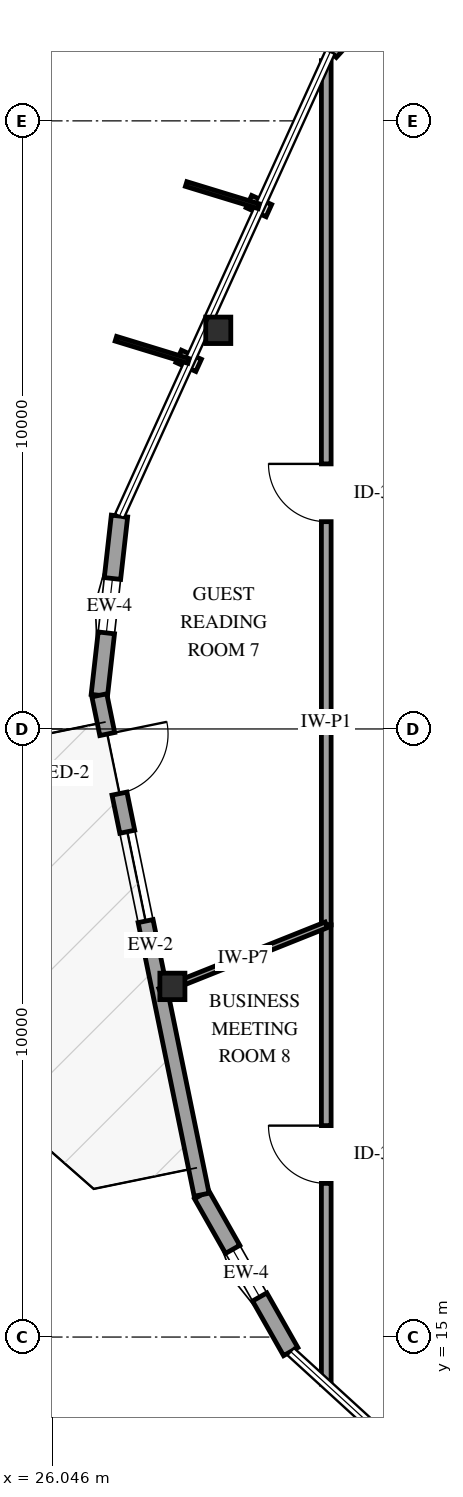
"""IFC4 building model, lengths in metres.
Left out: names, types, materials, properties, quantities, classifications, styles, units other than length and angle.
Written with IfcOpenShell. Run it as: python <this file> out.ifc"""

import sys

from ifc_helpers import new_model, si_unit, direction, frame, frame_2d, origin, origin_2d, place, context, subcontext, project, spatial, rectangle, i_section, extrude, element, fill, save


model = new_model("IFC4")
c1 = context("Model", 3, precision=1e-05, world=origin(), true_north=direction((0.0, 1.0)))
c2 = subcontext(c1, "Body", "Model", "MODEL_VIEW")
j1 = project(units=[si_unit("LENGTHUNIT", "METRE"), si_unit("PLANEANGLEUNIT", "RADIAN")], contexts=[c1])
p1 = place(None, origin())
s1 = spatial("IfcSite", under=j1, at=p1, CompositionType="ELEMENT")
p2 = place(p1, origin())
s2 = spatial("IfcBuilding", under=s1, at=p2, CompositionType="ELEMENT")
p3 = place(p2, frame((0.0, 0.0, 142.6)))
s3 = spatial("IfcBuildingStorey", under=s2, at=p3, CompositionType="ELEMENT", Elevation=142.6)
for number, where, z_axis, x_axis in (
    (1, (28.774, 31.556, 0.0), (0.0, 0.0, 1.0), (1.0, 0.0, 0.0)),
    (2, (28.02, 20.766, 0.0), (0.0, 0.0, 1.0), (1.0, 0.0, 0.0)),
):
    element("IfcColumn", number, at=place(p3, frame(where, z_axis=z_axis, x_axis=x_axis)), inside=s3, PredefinedType="COLUMN", context=c2, shape_type="SweptSolid", body=[
        extrude(i_section(OverallWidth=0.412, OverallDepth=0.435, WebThickness=0.036, FlangeThickness=0.057, FilletRadius=0.038, at=origin_2d()), origin(), (0.0, 0.0, 1.0), 3.6),
    ])
p4 = place(p3, frame((32.617, 38.325, 0.0), z_axis=(0.0, 0.0, 1.0), x_axis=(-0.67449763944, -0.738277003834, 0.0)))
e3 = element("IfcWall", 3, at=p4, inside=s3, PredefinedType="SOLIDWALL", context=c2, shape_type="SweptSolid", body=[
    extrude(rectangle(XDim=2.967, YDim=0.27, at=frame_2d((1.483, 0.0))), origin(), (0.0, 0.0, 1.0), 2.679),
])
p5 = place(p3, frame((27.15, 28.501, 0.0), z_axis=(0.0, 0.0, 1.0), x_axis=(-0.111840485986, -0.993726172391, 0.0)))
e4 = element("IfcWall", 4, at=p5, inside=s3, PredefinedType="SOLIDWALL", context=c2, shape_type="SweptSolid", body=[
    extrude(rectangle(XDim=2.967, YDim=0.27, at=frame_2d((1.483, 0.0))), origin(), (0.0, 0.0, 1.0), 2.679),
])
p6 = place(p5, frame((1.033, 0.0, 0.75)))
e5 = element("IfcOpeningElement", 5, at=p6, cuts=e4, PredefinedType="OPENING", context=c2, shape_type="SweptSolid", body=[
    extrude(rectangle(XDim=0.9, YDim=1.5, at=frame_2d((0.45, 0.75))), frame((0.0, 0.145, 0.0), z_axis=(0.0, -1.0, 0.0), x_axis=(1.0, 0.0, 0.0)), (0.0, 0.0, 1.0), 0.29),
])
p7 = place(p3, frame((28.501, 17.34, 0.0), z_axis=(0.0, 0.0, 1.0), x_axis=(0.493637484398, -0.869667772196, 0.0)))
e6 = element("IfcWall", 6, at=p7, inside=s3, PredefinedType="SOLIDWALL", context=c2, shape_type="SweptSolid", body=[
    extrude(rectangle(XDim=2.967, YDim=0.27, at=frame_2d((1.483, 0.0))), origin(), (0.0, 0.0, 1.0), 2.679),
])
p8 = place(p7, frame((1.033, 0.0, 0.75)))
e7 = element("IfcOpeningElement", 7, at=p8, cuts=e6, PredefinedType="OPENING", context=c2, shape_type="SweptSolid", body=[
    extrude(rectangle(XDim=0.9, YDim=1.5, at=frame_2d((0.45, 0.75))), frame((0.0, 0.145, 0.0), z_axis=(0.0, -1.0, 0.0), x_axis=(1.0, 0.0, 0.0)), (0.0, 0.0, 1.0), 0.29),
])
p9 = place(p3, frame((26.818, 25.553, 0.0), z_axis=(0.0, 0.0, 1.0), x_axis=(0.200734189033, -0.979645744825, 0.0)))
e8 = element("IfcWall", 8, at=p9, inside=s3, PredefinedType="SOLIDWALL", context=c2, shape_type="SweptSolid", body=[
    extrude(rectangle(XDim=8.384, YDim=0.25, at=frame_2d((4.192, 0.0))), origin(), (0.0, 0.0, 1.0), 2.679),
])
p10 = place(p9, frame((0.65, 0.0, 0.0)))
e9 = element("IfcOpeningElement", 9, at=p10, cuts=e8, PredefinedType="OPENING", context=c2, shape_type="SweptSolid", body=[
    extrude(rectangle(XDim=1.0, YDim=2.15, at=frame_2d((0.5, 1.075))), frame((0.0, 0.135, 0.0), z_axis=(0.0, -1.0, 0.0), x_axis=(1.0, 0.0, 0.0)), (0.0, 0.0, 1.0), 0.27),
])
p11 = place(p9, frame((2.29, 0.0, 0.72)))
e10 = element("IfcOpeningElement", 10, at=p11, cuts=e8, PredefinedType="OPENING", context=c2, shape_type="SweptSolid", body=[
    extrude(rectangle(XDim=1.5, YDim=1.7, at=frame_2d((0.75, 0.85))), frame((0.0, 0.135, 0.0), z_axis=(0.0, -1.0, 0.0), x_axis=(1.0, 0.0, 0.0)), (0.0, 0.0, 1.0), 0.27),
])
p12 = place(p3, frame((30.55, 21.778, 0.0), z_axis=(0.0, 0.0, 1.0), x_axis=(0.0, 1.0, 0.0)))
e11 = element("IfcWall", 11, at=p12, inside=s3, PredefinedType="PARTITIONING", context=c2, shape_type="SweptSolid", body=[
    extrude(rectangle(XDim=14.212, YDim=0.16, at=frame_2d((7.106, 0.0))), origin(), (0.0, 0.0, 1.0), 3.3),
])
p13 = place(p12, frame((6.631, 0.0, 0.0)))
e12 = element("IfcOpeningElement", 12, at=p13, cuts=e11, PredefinedType="OPENING", context=c2, shape_type="SweptSolid", body=[
    extrude(rectangle(XDim=0.95, YDim=2.15, at=frame_2d((0.475, 1.075))), frame((0.0, 0.09, 0.0), z_axis=(0.0, -1.0, 0.0), x_axis=(1.0, 0.0, 0.0)), (0.0, 0.0, 1.0), 0.18),
])
p14 = place(p3, frame((30.55, 14.226, 0.0), z_axis=(0.0, 0.0, 1.0), x_axis=(0.0, 1.0, 0.0)))
e13 = element("IfcWall", 13, at=p14, inside=s3, PredefinedType="PARTITIONING", context=c2, shape_type="SweptSolid", body=[
    extrude(rectangle(XDim=7.552, YDim=0.16, at=frame_2d((3.776, 0.0))), origin(), (0.0, 0.0, 1.0), 3.3),
])
p15 = place(p14, frame((3.301, 0.0, 0.0)))
e14 = element("IfcOpeningElement", 14, at=p15, cuts=e13, PredefinedType="OPENING", context=c2, shape_type="SweptSolid", body=[
    extrude(rectangle(XDim=0.95, YDim=2.15, at=frame_2d((0.475, 1.075))), frame((0.0, 0.09, 0.0), z_axis=(0.0, -1.0, 0.0), x_axis=(1.0, 0.0, 0.0)), (0.0, 0.0, 1.0), 0.18),
])
p16 = place(p3, frame((30.55, 21.778, 0.0), z_axis=(0.0, 0.0, 1.0), x_axis=(-0.928551008746, -0.371204827766, 0.0)))
e15 = element("IfcWall", 15, at=p16, inside=s3, PredefinedType="PARTITIONING", context=c2, shape_type="SweptSolid", body=[
    extrude(rectangle(XDim=2.945, YDim=0.1, at=frame_2d((1.472, 0.0))), origin(), (0.0, 0.0, 1.0), 3.3),
])
p17 = place(p6, origin())
e16 = element("IfcWindow", 16, at=p17, inside=s3, PartitioningType="SINGLE_PANEL", PredefinedType="WINDOW", context=c2, shape_type="SweptSolid", body=[
    extrude(rectangle(XDim=0.9, YDim=1.5, at=frame_2d((0.45, 0.75))), frame((0.0, 0.03, 0.0), z_axis=(0.0, -1.0, 0.0), x_axis=(1.0, 0.0, 0.0)), (0.0, 0.0, 1.0), 0.06),
])
fill(e5, e16)
p18 = place(p8, origin())
e17 = element("IfcWindow", 17, at=p18, inside=s3, PartitioningType="SINGLE_PANEL", PredefinedType="WINDOW", context=c2, shape_type="SweptSolid", body=[
    extrude(rectangle(XDim=0.9, YDim=1.5, at=frame_2d((0.45, 0.75))), frame((0.0, 0.03, 0.0), z_axis=(0.0, -1.0, 0.0), x_axis=(1.0, 0.0, 0.0)), (0.0, 0.0, 1.0), 0.06),
])
fill(e7, e17)
p19 = place(p10, origin())
e18 = element("IfcDoor", 18, at=p19, inside=s3, OperationType="SINGLE_SWING_LEFT", PredefinedType="DOOR", context=c2, shape_type="SweptSolid", body=[
    extrude(rectangle(XDim=1.0, YDim=2.15, at=frame_2d((0.5, 1.075))), frame((0.0, 0.025, 0.0), z_axis=(0.0, -1.0, 0.0), x_axis=(1.0, 0.0, 0.0)), (0.0, 0.0, 1.0), 0.05),
])
fill(e9, e18)
p20 = place(p11, origin())
e19 = element("IfcWindow", 19, at=p20, inside=s3, PartitioningType="SINGLE_PANEL", PredefinedType="WINDOW", context=c2, shape_type="SweptSolid", body=[
    extrude(rectangle(XDim=1.5, YDim=1.7, at=frame_2d((0.75, 0.85))), frame((0.0, 0.03, 0.0), z_axis=(0.0, -1.0, 0.0), x_axis=(1.0, 0.0, 0.0)), (0.0, 0.0, 1.0), 0.06),
])
fill(e10, e19)
p21 = place(p13, origin())
e20 = element("IfcDoor", 20, at=p21, inside=s3, OperationType="SINGLE_SWING_RIGHT", PredefinedType="DOOR", context=c2, shape_type="SweptSolid", body=[
    extrude(rectangle(XDim=0.95, YDim=2.15, at=frame_2d((0.475, 1.075))), frame((0.0, 0.025, 0.0), z_axis=(0.0, -1.0, 0.0), x_axis=(1.0, 0.0, 0.0)), (0.0, 0.0, 1.0), 0.05),
])
fill(e12, e20)
p22 = place(p15, origin())
e21 = element("IfcDoor", 21, at=p22, inside=s3, OperationType="SINGLE_SWING_RIGHT", PredefinedType="DOOR", context=c2, shape_type="SweptSolid", body=[
    extrude(rectangle(XDim=0.95, YDim=2.15, at=frame_2d((0.475, 1.075))), frame((0.0, 0.025, 0.0), z_axis=(0.0, -1.0, 0.0), x_axis=(1.0, 0.0, 0.0)), (0.0, 0.0, 1.0), 0.05),
])
fill(e14, e21)
save(model, sys.argv[1])
